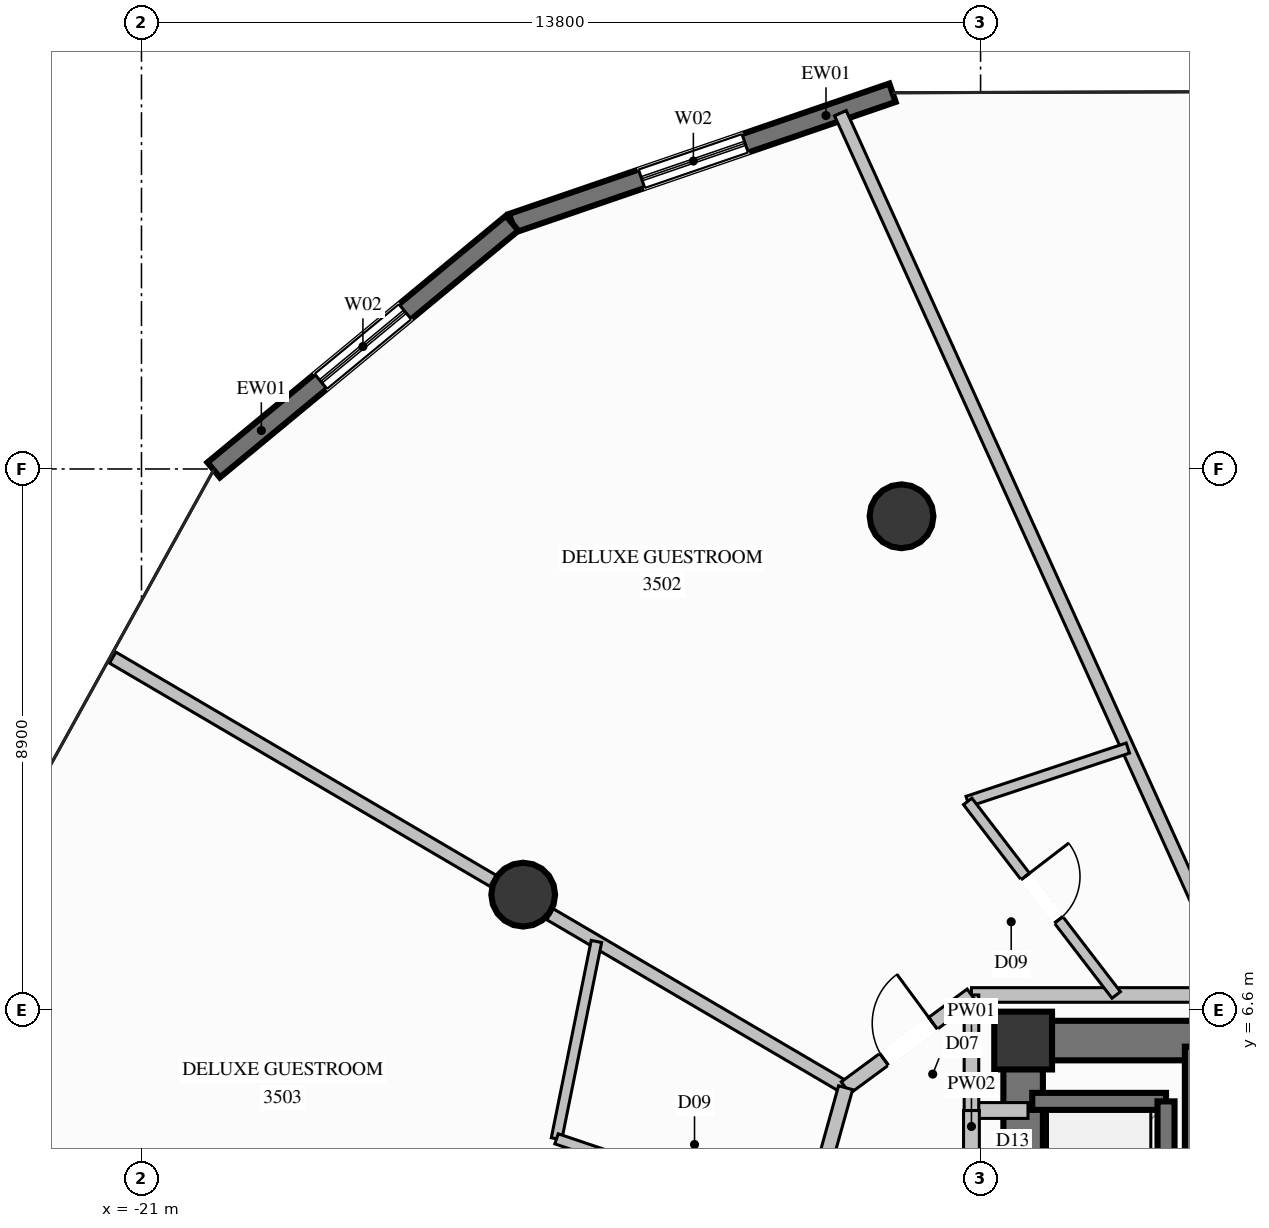
"""IFC4 building model, lengths in metres.
Left out: names, types, materials, properties, quantities, classifications, styles, units other than length and angle.
Written with IfcOpenShell. Run it as: python <this file> out.ifc"""

import sys

from ifc_helpers import new_model, si_unit, direction, frame, frame_2d, origin, origin_2d, place, context, subcontext, project, spatial, rectangle, circle, extrude, element, fill, save


model = new_model("IFC4")
c1 = context("Model", 3, precision=1e-05, world=origin(), true_north=direction((0.0, 1.0)))
c2 = subcontext(c1, "Body", "Model", "MODEL_VIEW")
j1 = project(units=[si_unit("LENGTHUNIT", "METRE"), si_unit("PLANEANGLEUNIT", "RADIAN")], contexts=[c1])
p1 = place(None, origin())
s1 = spatial("IfcSite", under=j1, at=p1, CompositionType="ELEMENT")
p2 = place(p1, origin())
s2 = spatial("IfcBuilding", under=s1, at=p2, CompositionType="ELEMENT")
p3 = place(p2, frame((0.0, 0.0, 131.4)))
s3 = spatial("IfcBuildingStorey", under=s2, at=p3, CompositionType="ELEMENT", Elevation=131.4)
p4 = place(p3, frame((-6.5, 6.1, 0.0), z_axis=(0.0, 0.0, 1.0), x_axis=(1.0, 0.0, 0.0)))
e1 = element("IfcColumn", 1, at=p4, inside=s3, PredefinedType="COLUMN", context=c2, shape_type="SweptSolid", body=[
    extrude(rectangle(XDim=0.95, YDim=0.95, at=origin_2d()), origin(), (0.0, 0.0, 1.0), 3.6),
])
p5 = place(p3, frame((-6.175, 6.1, 0.0), z_axis=(0.0, 0.0, 1.0), x_axis=(1.0, 0.0, 0.0)))
e2 = element("IfcWall", 2, at=p5, inside=s3, PredefinedType="SHEAR", context=c2, shape_type="SweptSolid", body=[
    extrude(rectangle(XDim=2.575, YDim=0.65, at=frame_2d((1.288, 0.0))), origin(), (0.0, 0.0, 1.0), 3.6),
])
p6 = place(p3, frame((-6.5, 2.35, 0.0), z_axis=(0.0, 0.0, 1.0), x_axis=(0.0, 1.0, 0.0)))
e3 = element("IfcWall", 3, at=p6, inside=s3, PredefinedType="SHEAR", context=c2, shape_type="SweptSolid", body=[
    extrude(rectangle(XDim=4.075, YDim=0.65, at=frame_2d((2.038, 0.0))), origin(), (0.0, 0.0, 1.0), 3.6),
])
for number, where, z_axis, x_axis in (
    (4, (-8.5, 14.722, 0.0), (0.0, 0.0, 1.0), (1.0, 0.0, 0.0)),
    (5, (-14.722, 8.5, 0.0), (0.0, 0.0, 1.0), (1.0, 0.0, 0.0)),
):
    element("IfcColumn", number, at=place(p3, frame(where, z_axis=z_axis, x_axis=x_axis)), inside=s3, PredefinedType="COLUMN", context=c2, shape_type="SweptSolid", body=[
        extrude(circle(Radius=0.525, at=origin_2d()), origin(), (0.0, 0.0, 1.0), 3.6),
    ])
p7 = place(p3, frame((-14.904, 19.542, 0.0), z_axis=(0.0, 0.0, 1.0), x_axis=(0.945927174226, 0.324379070011, 0.0)))
e6 = element("IfcWall", 6, at=p7, inside=s3, PredefinedType="SOLIDWALL", context=c2, shape_type="SweptSolid", body=[
    extrude(rectangle(XDim=6.613, YDim=0.32, at=frame_2d((3.306, 0.0))), origin(), (0.0, 0.0, 1.0), 3.35),
])
p8 = place(p7, frame((2.251, 0.0, 0.35)))
e7 = element("IfcOpeningElement", 7, at=p8, cuts=e6, PredefinedType="OPENING", context=c2, shape_type="SweptSolid", body=[
    extrude(rectangle(XDim=1.8, YDim=2.6, at=frame_2d((0.9, 1.3))), frame((0.0, 0.17, 0.0), z_axis=(0.0, -1.0, 0.0), x_axis=(1.0, 0.0, 0.0)), (0.0, 0.0, 1.0), 0.34),
])
p9 = place(p3, frame((-19.813, 15.484, 0.0), z_axis=(0.0, 0.0, 1.0), x_axis=(0.770738302789, 0.637151841098, 0.0)))
e8 = element("IfcWall", 8, at=p9, inside=s3, PredefinedType="SOLIDWALL", context=c2, shape_type="SweptSolid", body=[
    extrude(rectangle(XDim=6.369, YDim=0.32, at=frame_2d((3.185, 0.0))), origin(), (0.0, 0.0, 1.0), 3.35),
])
p10 = place(p9, frame((2.285, 0.0, 0.35)))
e9 = element("IfcOpeningElement", 9, at=p10, cuts=e8, PredefinedType="OPENING", context=c2, shape_type="SweptSolid", body=[
    extrude(rectangle(XDim=1.8, YDim=2.6, at=frame_2d((0.9, 1.3))), frame((0.0, 0.17, 0.0), z_axis=(0.0, -1.0, 0.0), x_axis=(1.0, 0.0, 0.0)), (0.0, 0.0, 1.0), 0.34),
])
p11 = place(p3, frame((-3.7, 6.0, 0.0), z_axis=(0.0, 0.0, 1.0), x_axis=(0.0, -1.0, 0.0)))
e10 = element("IfcWall", 10, at=p11, inside=s3, PredefinedType="SOLIDWALL", context=c2, shape_type="SweptSolid", body=[
    extrude(rectangle(XDim=2.5, YDim=0.28, at=frame_2d((1.25, 0.0))), origin(), (0.0, 0.0, 1.0), 3.35),
])
p12 = place(p3, frame((-4.15, 5.1, 0.0), z_axis=(0.0, 0.0, 1.0), x_axis=(-1.0, 0.0, 0.0)))
e11 = element("IfcWall", 11, at=p12, inside=s3, PredefinedType="SOLIDWALL", context=c2, shape_type="SweptSolid", body=[
    extrude(rectangle(XDim=2.2, YDim=0.28, at=frame_2d((1.1, 0.0))), origin(), (0.0, 0.0, 1.0), 3.35),
])
p13 = place(p3, frame((-4.15, 2.4, 0.0), z_axis=(0.0, 0.0, 1.0), x_axis=(0.0, 1.0, 0.0)))
e12 = element("IfcWall", 12, at=p13, inside=s3, PredefinedType="SOLIDWALL", context=c2, shape_type="SweptSolid", body=[
    extrude(rectangle(XDim=2.7, YDim=0.28, at=frame_2d((1.35, 0.0))), origin(), (0.0, 0.0, 1.0), 3.35),
])
p14 = place(p3, frame((-7.35, 4.95, 0.0), z_axis=(0.0, 0.0, 1.0), x_axis=(1.0, 0.0, 0.0)))
e13 = element("IfcWall", 13, at=p14, inside=s3, PredefinedType="PARTITIONING", context=c2, shape_type="SweptSolid", body=[
    extrude(rectangle(XDim=0.93, YDim=0.26, at=frame_2d((0.465, 0.0))), origin(), (0.0, 0.0, 1.0), 3.35),
])
p15 = place(p3, frame((-7.35, 2.55, 0.0), z_axis=(0.0, 0.0, 1.0), x_axis=(0.0, 1.0, 0.0)))
e14 = element("IfcWall", 14, at=p15, inside=s3, PredefinedType="PARTITIONING", context=c2, shape_type="SweptSolid", body=[
    extrude(rectangle(XDim=2.4, YDim=0.26, at=frame_2d((1.2, 0.0))), origin(), (0.0, 0.0, 1.0), 2.435),
])
p16 = place(p15, frame((0.775, 0.0, 0.0)))
e15 = element("IfcOpeningElement", 15, at=p16, cuts=e14, PredefinedType="OPENING", context=c2, shape_type="SweptSolid", body=[
    extrude(rectangle(XDim=0.85, YDim=2.05, at=frame_2d((0.425, 1.025))), frame((0.0, 0.14, 0.0), z_axis=(0.0, -1.0, 0.0), x_axis=(1.0, 0.0, 0.0)), (0.0, 0.0, 1.0), 0.28),
])
p17 = place(p3, frame((-7.35, 6.85, 0.0), z_axis=(0.0, 0.0, 1.0), x_axis=(1.0, 0.0, 0.0)))
e16 = element("IfcWall", 16, at=p17, inside=s3, PredefinedType="PARTITIONING", context=c2, shape_type="SweptSolid", body=[
    extrude(rectangle(XDim=14.7, YDim=0.24, at=frame_2d((7.35, 0.0))), origin(), (0.0, 0.0, 1.0), 2.435),
])
p18 = place(p3, frame((-7.35, 4.95, 0.0), z_axis=(0.0, 0.0, 1.0), x_axis=(0.0, 1.0, 0.0)))
e17 = element("IfcWall", 17, at=p18, inside=s3, PredefinedType="PARTITIONING", context=c2, shape_type="SweptSolid", body=[
    extrude(rectangle(XDim=1.9, YDim=0.24, at=frame_2d((0.95, 0.0))), origin(), (0.0, 0.0, 1.0), 2.435),
])
p19 = place(p3, frame((-9.42, 5.325, 0.0), z_axis=(0.0, 0.0, 1.0), x_axis=(-0.862477017481, 0.506096230293, 0.0)))
e18 = element("IfcWall", 18, at=p19, inside=s3, PredefinedType="PARTITIONING", context=c2, shape_type="SweptSolid", body=[
    extrude(rectangle(XDim=5.637, YDim=0.21, at=frame_2d((2.819, 0.0))), origin(), (0.0, 0.0, 1.0), 2.791),
])
p20 = place(p3, frame((-15.218, 8.727, 0.0), z_axis=(0.0, 0.0, 1.0), x_axis=(-0.862485729763, 0.50608138274, 0.0)))
e19 = element("IfcWall", 19, at=p20, inside=s3, PredefinedType="PARTITIONING", context=c2, shape_type="SweptSolid", body=[
    extrude(rectangle(XDim=7.254, YDim=0.21, at=frame_2d((3.627, 0.0))), origin(), (0.0, 0.0, 1.0), 3.35),
])
p21 = place(p3, frame((-2.94, 6.85, 0.0), z_axis=(0.0, 0.0, 1.0), x_axis=(-0.412490983748, 0.910961683238, 0.0)))
e20 = element("IfcWall", 20, at=p21, inside=s3, PredefinedType="PARTITIONING", context=c2, shape_type="SweptSolid", body=[
    extrude(rectangle(XDim=15.918, YDim=0.21, at=frame_2d((7.959, 0.0))), origin(), (0.0, 0.0, 1.0), 3.35),
])
p22 = place(p3, frame((-7.412, 10.033, 0.0), z_axis=(0.0, 0.0, 1.0), x_axis=(0.948797559609, 0.315884774689, 0.0)))
e21 = element("IfcWall", 21, at=p22, inside=s3, PredefinedType="PLUMBINGWALL", context=c2, shape_type="SweptSolid", body=[
    extrude(rectangle(XDim=2.776, YDim=0.175, at=frame_2d((1.388, 0.0))), origin(), (0.0, 0.0, 1.0), 2.985),
])
p23 = place(p3, frame((-7.412, 10.033, 0.0), z_axis=(0.0, 0.0, 1.0), x_axis=(0.608890025588, -0.793254648105, 0.0)))
e22 = element("IfcWall", 22, at=p23, inside=s3, PredefinedType="PLUMBINGWALL", context=c2, shape_type="SweptSolid", body=[
    extrude(rectangle(XDim=4.012, YDim=0.175, at=frame_2d((2.006, 0.0))), origin(), (0.0, 0.0, 1.0), 2.791),
])
p24 = place(p23, frame((1.556, 0.0, 0.0)))
e23 = element("IfcOpeningElement", 23, at=p24, cuts=e22, PredefinedType="OPENING", context=c2, shape_type="SweptSolid", body=[
    extrude(rectangle(XDim=0.9, YDim=2.1, at=frame_2d((0.45, 1.05))), frame((0.0, 0.098, 0.0), z_axis=(0.0, -1.0, 0.0), x_axis=(1.0, 0.0, 0.0)), (0.0, 0.0, 1.0), 0.195),
])
p25 = place(p3, frame((-9.42, 5.325, 0.0), z_axis=(0.0, 0.0, 1.0), x_axis=(0.805053450612, 0.593202277185, 0.0)))
e24 = element("IfcWall", 24, at=p25, inside=s3, PredefinedType="PARTITIONING", context=c2, shape_type="SweptSolid", body=[
    extrude(rectangle(XDim=2.571, YDim=0.24, at=frame_2d((1.286, 0.0))), origin(), (0.0, 0.0, 1.0), 3.35),
])
p26 = place(p25, frame((0.786, 0.0, 0.0)))
e25 = element("IfcOpeningElement", 25, at=p26, cuts=e24, PredefinedType="OPENING", context=c2, shape_type="SweptSolid", body=[
    extrude(rectangle(XDim=1.0, YDim=2.2, at=frame_2d((0.5, 1.1))), frame((0.0, 0.13, 0.0), z_axis=(0.0, -1.0, 0.0), x_axis=(1.0, 0.0, 0.0)), (0.0, 0.0, 1.0), 0.26),
])
p27 = place(p3, frame((-9.42, 5.325, 0.0), z_axis=(0.0, 0.0, 1.0), x_axis=(-0.268045342481, -0.963406297662, 0.0)))
e26 = element("IfcWall", 26, at=p27, inside=s3, PredefinedType="PARTITIONING", context=c2, shape_type="SweptSolid", body=[
    extrude(rectangle(XDim=2.321, YDim=0.24, at=frame_2d((1.16, 0.0))), origin(), (0.0, 0.0, 1.0), 3.35),
])
p28 = place(p3, frame((-13.518, 7.73, 0.0), z_axis=(0.0, 0.0, 1.0), x_axis=(-0.198086338377, -0.980184575755, 0.0)))
e27 = element("IfcWall", 27, at=p28, inside=s3, PredefinedType="PLUMBINGWALL", context=c2, shape_type="SweptSolid", body=[
    extrude(rectangle(XDim=3.312, YDim=0.175, at=frame_2d((1.656, 0.0))), origin(), (0.0, 0.0, 1.0), 3.35),
])
p29 = place(p3, frame((-10.042, 3.089, 0.0), z_axis=(0.0, 0.0, 1.0), x_axis=(-0.947478496839, 0.319819477249, 0.0)))
e28 = element("IfcWall", 28, at=p29, inside=s3, PredefinedType="PLUMBINGWALL", context=c2, shape_type="SweptSolid", body=[
    extrude(rectangle(XDim=4.361, YDim=0.175, at=frame_2d((2.181, 0.0))), origin(), (0.0, 0.0, 1.0), 3.35),
])
p30 = place(p29, frame((1.731, 0.0, 0.0)))
e29 = element("IfcOpeningElement", 29, at=p30, cuts=e28, PredefinedType="OPENING", context=c2, shape_type="SweptSolid", body=[
    extrude(rectangle(XDim=0.9, YDim=2.1, at=frame_2d((0.45, 1.05))), frame((0.0, 0.098, 0.0), z_axis=(0.0, -1.0, 0.0), x_axis=(1.0, 0.0, 0.0)), (0.0, 0.0, 1.0), 0.195),
])
p31 = place(p8, origin())
e30 = element("IfcWindow", 30, at=p31, inside=s3, PartitioningType="SINGLE_PANEL", PredefinedType="WINDOW", context=c2, shape_type="SweptSolid", body=[
    extrude(rectangle(XDim=1.8, YDim=2.6, at=frame_2d((0.9, 1.3))), frame((0.0, 0.03, 0.0), z_axis=(0.0, -1.0, 0.0), x_axis=(1.0, 0.0, 0.0)), (0.0, 0.0, 1.0), 0.06),
])
fill(e7, e30)
p32 = place(p10, origin())
e31 = element("IfcWindow", 31, at=p32, inside=s3, PartitioningType="SINGLE_PANEL", PredefinedType="WINDOW", context=c2, shape_type="SweptSolid", body=[
    extrude(rectangle(XDim=1.8, YDim=2.6, at=frame_2d((0.9, 1.3))), frame((0.0, 0.03, 0.0), z_axis=(0.0, -1.0, 0.0), x_axis=(1.0, 0.0, 0.0)), (0.0, 0.0, 1.0), 0.06),
])
fill(e9, e31)
p33 = place(p24, origin())
e32 = element("IfcDoor", 32, at=p33, inside=s3, OperationType="SINGLE_SWING_LEFT", PredefinedType="DOOR", context=c2, shape_type="SweptSolid", body=[
    extrude(rectangle(XDim=0.9, YDim=2.1, at=frame_2d((0.45, 1.05))), frame((0.0, 0.025, 0.0), z_axis=(0.0, -1.0, 0.0), x_axis=(1.0, 0.0, 0.0)), (0.0, 0.0, 1.0), 0.05),
])
fill(e23, e32)
p34 = place(p26, origin())
e33 = element("IfcDoor", 33, at=p34, inside=s3, OperationType="SINGLE_SWING_RIGHT", PredefinedType="DOOR", context=c2, shape_type="SweptSolid", body=[
    extrude(rectangle(XDim=1.0, YDim=2.2, at=frame_2d((0.5, 1.1))), frame((0.0, 0.025, 0.0), z_axis=(0.0, -1.0, 0.0), x_axis=(1.0, 0.0, 0.0)), (0.0, 0.0, 1.0), 0.05),
])
fill(e25, e33)
save(model, sys.argv[1])
